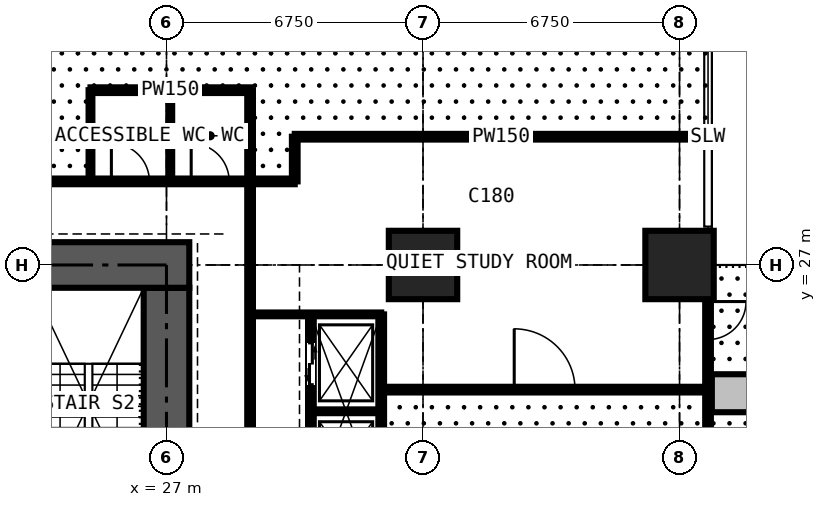
"""IFC4 building model, lengths in metres.
Left out: names, types, materials, properties, quantities, classifications, styles, units other than length and angle.
Written with IfcOpenShell. Run it as: python <this file> out.ifc"""

import sys

from ifc_helpers import new_model, si_unit, direction, frame, frame_2d, origin, origin_2d, place, context, subcontext, project, spatial, rectangle, extrude, element, fill, save


model = new_model("IFC4")
c1 = context("Model", 3, precision=1e-05, world=origin(), true_north=direction((0.0, 1.0)))
c2 = subcontext(c1, "Body", "Model", "MODEL_VIEW")
j1 = project(units=[si_unit("LENGTHUNIT", "METRE"), si_unit("PLANEANGLEUNIT", "RADIAN")], contexts=[c1])
p1 = place(None, origin())
s1 = spatial("IfcSite", under=j1, at=p1, CompositionType="ELEMENT")
p2 = place(p1, origin())
s2 = spatial("IfcBuilding", under=s1, at=p2, CompositionType="ELEMENT")
p3 = place(p2, frame((0.0, 0.0, 46.8)))
s3 = spatial("IfcBuildingStorey", under=s2, at=p3, CompositionType="ELEMENT", Elevation=46.8)
for number, where, z_axis, x_axis in (
    (1, (33.75, 27.0, 0.0), (0.0, 0.0, 1.0), (1.0, 0.0, 0.0)),
    (2, (40.5, 27.0, 0.0), (0.0, 0.0, 1.0), (1.0, 0.0, 0.0)),
):
    element("IfcColumn", number, at=place(p3, frame(where, z_axis=z_axis, x_axis=x_axis)), inside=s3, PredefinedType="COLUMN", context=c2, shape_type="SweptSolid", body=[
        extrude(rectangle(XDim=1.8, YDim=1.8, at=origin_2d()), origin(), (0.0, 0.0, 1.0), 3.6),
    ])
p4 = place(p3, frame((27.0, 14.1, 0.0), z_axis=(0.0, 0.0, 1.0), x_axis=(0.0, 1.0, 0.0)))
e3 = element("IfcWall", 3, at=p4, inside=s3, PredefinedType="SHEAR", context=c2, shape_type="SweptSolid", body=[
    extrude(rectangle(XDim=12.3, YDim=1.2, at=frame_2d((6.15, 0.0))), origin(), (0.0, 0.0, 1.0), 3.6),
])
p5 = place(p4, frame((3.65, 0.0, 0.0)))
e4 = element("IfcOpeningElement", 4, at=p5, cuts=e3, PredefinedType="OPENING", context=c2, shape_type="SweptSolid", body=[
    extrude(rectangle(XDim=1.2, YDim=2.2, at=frame_2d((0.6, 1.1))), frame((0.0, 0.61, 0.0), z_axis=(0.0, -1.0, 0.0), x_axis=(1.0, 0.0, 0.0)), (0.0, 0.0, 1.0), 1.22),
])
p6 = place(p3, frame((27.6, 27.0, 0.0), z_axis=(0.0, 0.0, 1.0), x_axis=(-1.0, 0.0, 0.0)))
e5 = element("IfcWall", 5, at=p6, inside=s3, PredefinedType="SHEAR", context=c2, shape_type="SweptSolid", body=[
    extrude(rectangle(XDim=14.7, YDim=1.2, at=frame_2d((7.35, 0.0))), origin(), (0.0, 0.0, 1.0), 3.6),
])
p7 = place(p6, frame((5.225, 0.0, 0.0)))
e6 = element("IfcOpeningElement", 6, at=p7, cuts=e5, PredefinedType="OPENING", context=c2, shape_type="SweptSolid", body=[
    extrude(rectangle(XDim=0.9, YDim=2.2, at=frame_2d((0.45, 1.1))), frame((0.0, 0.61, 0.0), z_axis=(0.0, -1.0, 0.0), x_axis=(1.0, 0.0, 0.0)), (0.0, 0.0, 1.0), 1.22),
])
p8 = place(p6, frame((8.2, 0.0, 0.0)))
e7 = element("IfcOpeningElement", 7, at=p8, cuts=e5, PredefinedType="OPENING", context=c2, shape_type="SweptSolid", body=[
    extrude(rectangle(XDim=1.0, YDim=2.2, at=frame_2d((0.5, 1.1))), frame((0.0, 0.61, 0.0), z_axis=(0.0, -1.0, 0.0), x_axis=(1.0, 0.0, 0.0)), (0.0, 0.0, 1.0), 1.22),
])
p9 = place(p3, frame((41.25, 27.0, 0.0), z_axis=(0.0, 0.0, 1.0), x_axis=(0.0, -1.0, 0.0)))
e8 = element("IfcWall", 8, at=p9, inside=s3, PredefinedType="SOLIDWALL", context=c2, shape_type="SweptSolid", body=[
    extrude(rectangle(XDim=6.75, YDim=0.15, at=frame_2d((3.375, 0.0))), origin(), (0.0, 0.0, 1.0), 3.375),
])
p10 = place(p9, frame((0.962, 0.0, 0.0)))
e9 = element("IfcOpeningElement", 9, at=p10, cuts=e8, PredefinedType="OPENING", context=c2, shape_type="SweptSolid", body=[
    extrude(rectangle(XDim=1.0, YDim=2.2, at=frame_2d((0.5, 1.1))), frame((0.0, 0.085, 0.0), z_axis=(0.0, -1.0, 0.0), x_axis=(1.0, 0.0, 0.0)), (0.0, 0.0, 1.0), 0.17),
])
p11 = place(p9, frame((2.025, 0.0, 0.9)))
e10 = element("IfcOpeningElement", 10, at=p11, cuts=e8, PredefinedType="OPENING", context=c2, shape_type="SweptSolid", body=[
    extrude(rectangle(XDim=1.2, YDim=1.8, at=frame_2d((0.6, 0.9))), frame((0.0, 0.085, 0.0), z_axis=(0.0, -1.0, 0.0), x_axis=(1.0, 0.0, 0.0)), (0.0, 0.0, 1.0), 0.17),
])
p12 = place(p9, frame((4.788, 0.0, 0.0)))
e11 = element("IfcOpeningElement", 11, at=p12, cuts=e8, PredefinedType="OPENING", context=c2, shape_type="SweptSolid", body=[
    extrude(rectangle(XDim=1.0, YDim=2.2, at=frame_2d((0.5, 1.1))), frame((0.0, 0.085, 0.0), z_axis=(0.0, -1.0, 0.0), x_axis=(1.0, 0.0, 0.0)), (0.0, 0.0, 1.0), 0.17),
])
p13 = place(p9, frame((3.525, 0.0, 0.9)))
e12 = element("IfcOpeningElement", 12, at=p13, cuts=e8, PredefinedType="OPENING", context=c2, shape_type="SweptSolid", body=[
    extrude(rectangle(XDim=1.2, YDim=1.8, at=frame_2d((0.6, 0.9))), frame((0.0, 0.085, 0.0), z_axis=(0.0, -1.0, 0.0), x_axis=(1.0, 0.0, 0.0)), (0.0, 0.0, 1.0), 0.17),
])
p14 = place(p3, frame((41.35, 23.625, 0.0), z_axis=(0.0, 0.0, 1.0), x_axis=(1.0, 0.0, 0.0)))
e13 = element("IfcWall", 13, at=p14, inside=s3, PredefinedType="USERDEFINED", context=c2, shape_type="SweptSolid", body=[
    extrude(rectangle(XDim=2.2, YDim=1.0, at=frame_2d((1.1, 0.0))), origin(), (0.0, 0.0, 1.0), 0.9),
])
p15 = place(p3, frame((11.3, 29.2, 0.0), z_axis=(0.0, 0.0, 1.0), x_axis=(1.0, 0.0, 0.0)))
e14 = element("IfcWall", 14, at=p15, inside=s3, PredefinedType="PARTITIONING", context=c2, shape_type="SweptSolid", body=[
    extrude(rectangle(XDim=19.075, YDim=0.15, at=frame_2d((9.538, 0.0))), origin(), (0.0, 0.0, 1.0), 3.375),
])
p16 = place(p15, frame((14.25, 0.0, 0.0)))
e15 = element("IfcOpeningElement", 15, at=p16, cuts=e14, PredefinedType="OPENING", context=c2, shape_type="SweptSolid", body=[
    extrude(rectangle(XDim=1.0, YDim=2.2, at=frame_2d((0.5, 1.1))), frame((0.0, 0.085, 0.0), z_axis=(0.0, -1.0, 0.0), x_axis=(1.0, 0.0, 0.0)), (0.0, 0.0, 1.0), 0.17),
])
p17 = place(p15, frame((16.35, 0.0, 0.0)))
e16 = element("IfcOpeningElement", 16, at=p17, cuts=e14, PredefinedType="OPENING", context=c2, shape_type="SweptSolid", body=[
    extrude(rectangle(XDim=1.0, YDim=2.2, at=frame_2d((0.5, 1.1))), frame((0.0, 0.085, 0.0), z_axis=(0.0, -1.0, 0.0), x_axis=(1.0, 0.0, 0.0)), (0.0, 0.0, 1.0), 0.17),
])
p18 = place(p15, frame((8.859, 0.0, 0.0)))
e17 = element("IfcOpeningElement", 17, at=p18, cuts=e14, PredefinedType="OPENING", context=c2, shape_type="SweptSolid", body=[
    extrude(rectangle(XDim=1.5, YDim=2.2, at=frame_2d((0.75, 1.1))), frame((0.0, 0.085, 0.0), z_axis=(0.0, -1.0, 0.0), x_axis=(1.0, 0.0, 0.0)), (0.0, 0.0, 1.0), 0.17),
])
p19 = place(p3, frame((25.0, 29.2, 0.0), z_axis=(0.0, 0.0, 1.0), x_axis=(0.0, 1.0, 0.0)))
e18 = element("IfcWall", 18, at=p19, inside=s3, PredefinedType="PARTITIONING", context=c2, shape_type="SweptSolid", body=[
    extrude(rectangle(XDim=2.4, YDim=0.1, at=frame_2d((1.2, 0.0))), origin(), (0.0, 0.0, 1.0), 3.375),
])
p20 = place(p3, frame((25.0, 31.6, 0.0), z_axis=(0.0, 0.0, 1.0), x_axis=(1.0, 0.0, 0.0)))
e19 = element("IfcWall", 19, at=p20, inside=s3, PredefinedType="PARTITIONING", context=c2, shape_type="SweptSolid", body=[
    extrude(rectangle(XDim=4.2, YDim=0.15, at=frame_2d((2.1, 0.0))), origin(), (0.0, 0.0, 1.0), 3.375),
])
p21 = place(p3, frame((27.1, 29.2, 0.0), z_axis=(0.0, 0.0, 1.0), x_axis=(0.0, 1.0, 0.0)))
e20 = element("IfcWall", 20, at=p21, inside=s3, PredefinedType="PARTITIONING", context=c2, shape_type="SweptSolid", body=[
    extrude(rectangle(XDim=2.4, YDim=0.1, at=frame_2d((1.2, 0.0))), origin(), (0.0, 0.0, 1.0), 2.877),
])
p22 = place(p3, frame((29.2, 11.3, 0.0), z_axis=(0.0, 0.0, 1.0), x_axis=(0.0, 1.0, 0.0)))
e21 = element("IfcWall", 21, at=p22, inside=s3, PredefinedType="PARTITIONING", context=c2, shape_type="SweptSolid", body=[
    extrude(rectangle(XDim=20.3, YDim=0.15, at=frame_2d((10.15, 0.0))), origin(), (0.0, 0.0, 1.0), 3.375),
])
p23 = place(p22, frame((8.35, 0.0, 0.0)))
e22 = element("IfcOpeningElement", 22, at=p23, cuts=e21, PredefinedType="OPENING", context=c2, shape_type="SweptSolid", body=[
    extrude(rectangle(XDim=1.2, YDim=2.2, at=frame_2d((0.6, 1.1))), frame((0.0, 0.085, 0.0), z_axis=(0.0, -1.0, 0.0), x_axis=(1.0, 0.0, 0.0)), (0.0, 0.0, 1.0), 0.17),
])
p24 = place(p3, frame((29.2, 25.7, 0.0), z_axis=(0.0, 0.0, 1.0), x_axis=(1.0, 0.0, 0.0)))
e23 = element("IfcWall", 23, at=p24, inside=s3, PredefinedType="SHEAR", context=c2, shape_type="SweptSolid", body=[
    extrude(rectangle(XDim=3.45, YDim=0.1, at=frame_2d((1.725, 0.0))), origin(), (0.0, 0.0, 1.0), 3.375),
])
p25 = place(p3, frame((30.375, 29.2, 0.0), z_axis=(0.0, 0.0, 1.0), x_axis=(0.0, 1.0, 0.0)))
e24 = element("IfcWall", 24, at=p25, inside=s3, PredefinedType="PARTITIONING", context=c2, shape_type="SweptSolid", body=[
    extrude(rectangle(XDim=1.175, YDim=0.15, at=frame_2d((0.587, 0.0))), origin(), (0.0, 0.0, 1.0), 3.375),
])
p26 = place(p3, frame((30.375, 30.375, 0.0), z_axis=(0.0, 0.0, 1.0), x_axis=(1.0, 0.0, 0.0)))
e25 = element("IfcWall", 25, at=p26, inside=s3, PredefinedType="PARTITIONING", context=c2, shape_type="SweptSolid", body=[
    extrude(rectangle(XDim=10.859, YDim=0.15, at=frame_2d((5.429, 0.0))), origin(), (0.0, 0.0, 1.0), 3.375),
])
p27 = place(p3, frame((30.8, 14.8, 0.0), z_axis=(0.0, 0.0, 1.0), x_axis=(0.0, 1.0, 0.0)))
e26 = element("IfcWall", 26, at=p27, inside=s3, PredefinedType="PARTITIONING", context=c2, shape_type="SweptSolid", body=[
    extrude(rectangle(XDim=10.9, YDim=0.15, at=frame_2d((5.45, 0.0))), origin(), (0.0, 0.0, 1.0), 3.375),
])
p28 = place(p27, frame((0.75, 0.0, 0.0)))
e27 = element("IfcOpeningElement", 27, at=p28, cuts=e26, PredefinedType="OPENING", context=c2, shape_type="SweptSolid", body=[
    extrude(rectangle(XDim=1.1, YDim=2.2, at=frame_2d((0.55, 1.1))), frame((0.0, 0.085, 0.0), z_axis=(0.0, -1.0, 0.0), x_axis=(1.0, 0.0, 0.0)), (0.0, 0.0, 1.0), 0.17),
])
p29 = place(p27, frame((3.25, 0.0, 0.0)))
e28 = element("IfcOpeningElement", 28, at=p29, cuts=e26, PredefinedType="OPENING", context=c2, shape_type="SweptSolid", body=[
    extrude(rectangle(XDim=1.1, YDim=2.2, at=frame_2d((0.55, 1.1))), frame((0.0, 0.085, 0.0), z_axis=(0.0, -1.0, 0.0), x_axis=(1.0, 0.0, 0.0)), (0.0, 0.0, 1.0), 0.17),
])
p30 = place(p27, frame((6.5, 0.0, 0.0)))
e29 = element("IfcOpeningElement", 29, at=p30, cuts=e26, PredefinedType="OPENING", context=c2, shape_type="SweptSolid", body=[
    extrude(rectangle(XDim=1.1, YDim=2.2, at=frame_2d((0.55, 1.1))), frame((0.0, 0.085, 0.0), z_axis=(0.0, -1.0, 0.0), x_axis=(1.0, 0.0, 0.0)), (0.0, 0.0, 1.0), 0.17),
])
p31 = place(p27, frame((9.05, 0.0, 0.0)))
e30 = element("IfcOpeningElement", 30, at=p31, cuts=e26, PredefinedType="OPENING", context=c2, shape_type="SweptSolid", body=[
    extrude(rectangle(XDim=1.1, YDim=2.2, at=frame_2d((0.55, 1.1))), frame((0.0, 0.085, 0.0), z_axis=(0.0, -1.0, 0.0), x_axis=(1.0, 0.0, 0.0)), (0.0, 0.0, 1.0), 0.17),
])
p32 = place(p3, frame((30.8, 23.15, 0.0), z_axis=(0.0, 0.0, 1.0), x_axis=(1.0, 0.0, 0.0)))
e31 = element("IfcWall", 31, at=p32, inside=s3, PredefinedType="SHEAR", context=c2, shape_type="SweptSolid", body=[
    extrude(rectangle(XDim=1.85, YDim=0.1, at=frame_2d((0.925, 0.0))), origin(), (0.0, 0.0, 1.0), 3.375),
])
p33 = place(p3, frame((32.65, 20.6, 0.0), z_axis=(0.0, 0.0, 1.0), x_axis=(0.0, 1.0, 0.0)))
e32 = element("IfcWall", 32, at=p33, inside=s3, PredefinedType="PARTITIONING", context=c2, shape_type="SweptSolid", body=[
    extrude(rectangle(XDim=5.1, YDim=0.15, at=frame_2d((2.55, 0.0))), origin(), (0.0, 0.0, 1.0), 3.375),
])
p34 = place(p3, frame((32.65, 23.72, 0.0), z_axis=(0.0, 0.0, 1.0), x_axis=(1.0, 0.0, 0.0)))
e33 = element("IfcWall", 33, at=p34, inside=s3, PredefinedType="PARTITIONING", context=c2, shape_type="SweptSolid", body=[
    extrude(rectangle(XDim=8.525, YDim=0.15, at=frame_2d((4.263, 0.0))), origin(), (0.0, 0.0, 1.0), 3.375),
])
p35 = place(p34, frame((3.5, 0.0, 0.0)))
e34 = element("IfcOpeningElement", 34, at=p35, cuts=e33, PredefinedType="OPENING", context=c2, shape_type="SweptSolid", body=[
    extrude(rectangle(XDim=1.6, YDim=2.4, at=frame_2d((0.8, 1.2))), frame((0.0, 0.085, 0.0), z_axis=(0.0, -1.0, 0.0), x_axis=(1.0, 0.0, 0.0)), (0.0, 0.0, 1.0), 0.17),
])
p36 = place(p10, origin())
e35 = element("IfcDoor", 35, at=p36, inside=s3, OperationType="SINGLE_SWING_LEFT", PredefinedType="DOOR", context=c2, shape_type="SweptSolid", body=[
    extrude(rectangle(XDim=1.0, YDim=2.2, at=frame_2d((0.5, 1.1))), frame((0.0, 0.025, 0.0), z_axis=(0.0, -1.0, 0.0), x_axis=(1.0, 0.0, 0.0)), (0.0, 0.0, 1.0), 0.05),
])
fill(e9, e35)
p37 = place(p11, origin())
e36 = element("IfcWindow", 36, at=p37, inside=s3, PartitioningType="SINGLE_PANEL", PredefinedType="WINDOW", context=c2, shape_type="SweptSolid", body=[
    extrude(rectangle(XDim=1.2, YDim=1.8, at=frame_2d((0.6, 0.9))), frame((0.0, 0.03, 0.0), z_axis=(0.0, -1.0, 0.0), x_axis=(1.0, 0.0, 0.0)), (0.0, 0.0, 1.0), 0.06),
])
fill(e10, e36)
p38 = place(p13, origin())
e37 = element("IfcWindow", 37, at=p38, inside=s3, PartitioningType="SINGLE_PANEL", PredefinedType="WINDOW", context=c2, shape_type="SweptSolid", body=[
    extrude(rectangle(XDim=1.2, YDim=1.8, at=frame_2d((0.6, 0.9))), frame((0.0, 0.03, 0.0), z_axis=(0.0, -1.0, 0.0), x_axis=(1.0, 0.0, 0.0)), (0.0, 0.0, 1.0), 0.06),
])
fill(e12, e37)
p39 = place(p35, origin())
e38 = element("IfcDoor", 38, at=p39, inside=s3, OperationType="DOUBLE_DOOR_SINGLE_SWING", PredefinedType="DOOR", context=c2, shape_type="SweptSolid", body=[
    extrude(rectangle(XDim=1.6, YDim=2.4, at=frame_2d((0.8, 1.2))), frame((0.0, 0.025, 0.0), z_axis=(0.0, -1.0, 0.0), x_axis=(1.0, 0.0, 0.0)), (0.0, 0.0, 1.0), 0.05),
])
fill(e34, e38)
p40 = place(p16, origin())
e39 = element("IfcDoor", 39, at=p40, inside=s3, OperationType="SINGLE_SWING_LEFT", PredefinedType="DOOR", context=c2, shape_type="SweptSolid", body=[
    extrude(rectangle(XDim=1.0, YDim=2.2, at=frame_2d((0.5, 1.1))), frame((0.0, 0.025, 0.0), z_axis=(0.0, -1.0, 0.0), x_axis=(1.0, 0.0, 0.0)), (0.0, 0.0, 1.0), 0.05),
])
fill(e15, e39)
p41 = place(p17, origin())
e40 = element("IfcDoor", 40, at=p41, inside=s3, OperationType="SINGLE_SWING_LEFT", PredefinedType="DOOR", context=c2, shape_type="SweptSolid", body=[
    extrude(rectangle(XDim=1.0, YDim=2.2, at=frame_2d((0.5, 1.1))), frame((0.0, 0.025, 0.0), z_axis=(0.0, -1.0, 0.0), x_axis=(1.0, 0.0, 0.0)), (0.0, 0.0, 1.0), 0.05),
])
fill(e16, e40)
p42 = place(p31, origin())
e41 = element("IfcDoor", 41, at=p42, inside=s3, OperationType="DOUBLE_DOOR_SLIDING", PredefinedType="DOOR", context=c2, shape_type="SweptSolid", body=[
    extrude(rectangle(XDim=1.1, YDim=2.2, at=frame_2d((0.55, 1.1))), frame((0.0, 0.025, 0.0), z_axis=(0.0, -1.0, 0.0), x_axis=(1.0, 0.0, 0.0)), (0.0, 0.0, 1.0), 0.05),
])
fill(e30, e41)
save(model, sys.argv[1])
